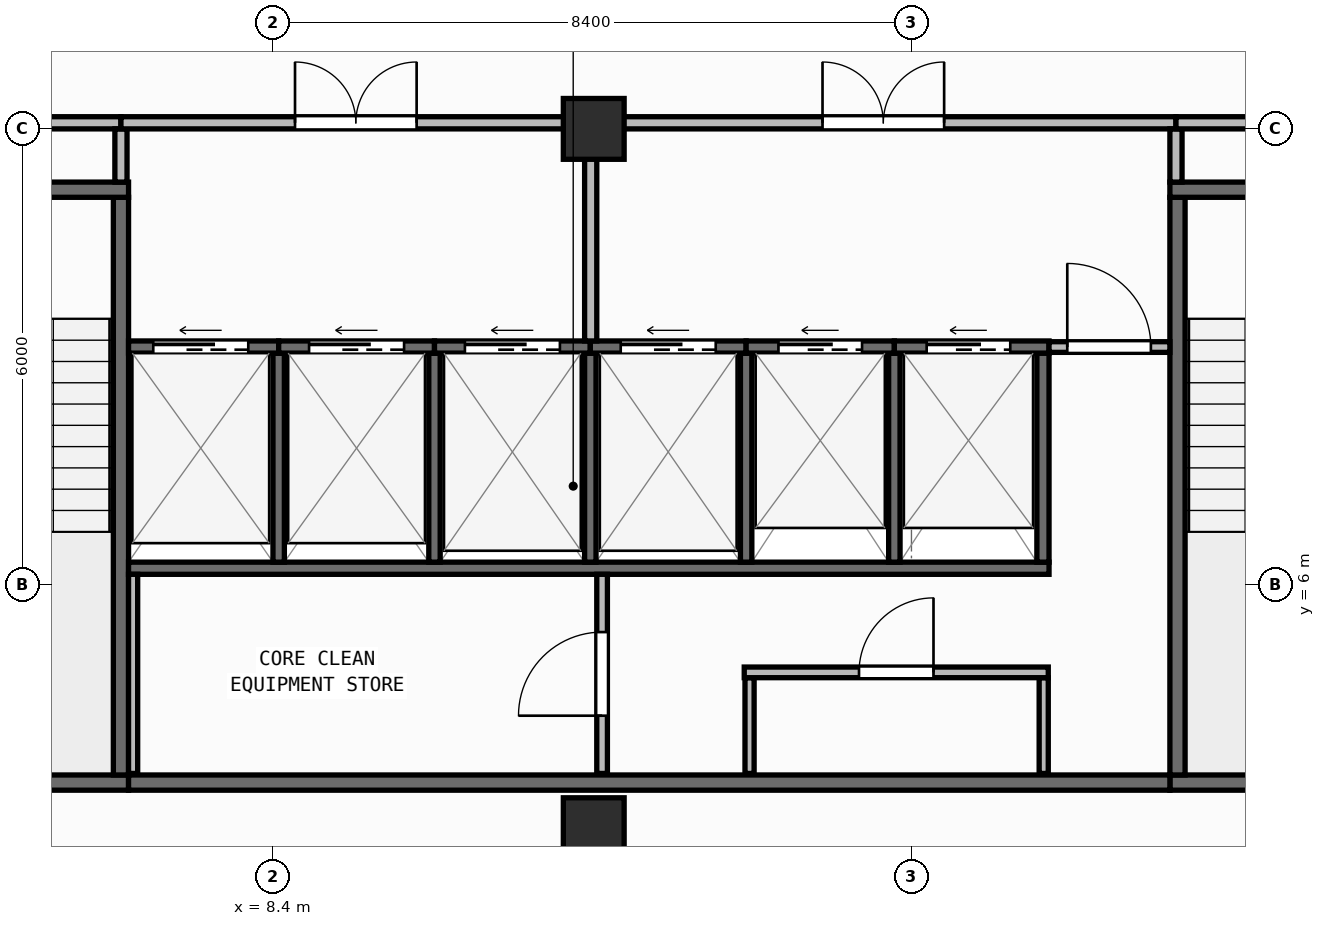
"""IFC4 building model, lengths in metres.
Left out: names, types, materials, properties, quantities, classifications, styles, units other than length and angle.
Written with IfcOpenShell. Run it as: python <this file> out.ifc"""

import sys

from ifc_helpers import new_model, si_unit, direction, frame, frame_2d, origin, origin_2d, place, context, subcontext, project, spatial, rectangle, extrude, element, fill, save


model = new_model("IFC4")
c1 = context("Model", 3, precision=1e-05, world=origin(), true_north=direction((0.0, 1.0)))
c2 = subcontext(c1, "Body", "Model", "MODEL_VIEW")
j1 = project(units=[si_unit("LENGTHUNIT", "METRE"), si_unit("PLANEANGLEUNIT", "RADIAN")], contexts=[c1])
p1 = place(None, origin())
s1 = spatial("IfcSite", under=j1, at=p1, CompositionType="ELEMENT")
p2 = place(p1, origin())
s2 = spatial("IfcBuilding", under=s1, at=p2, CompositionType="ELEMENT")
p3 = place(p2, frame((0.0, 0.0, 264.45)))
s3 = spatial("IfcBuildingStorey", under=s2, at=p3, CompositionType="ELEMENT", Elevation=264.45)
for number, where, z_axis, x_axis in (
    (1, (12.62, 2.8, 0.0), (0.0, 0.0, 1.0), (1.0, 0.0, 0.0)),
    (2, (12.62, 12.0, 0.0), (0.0, 0.0, 1.0), (1.0, 0.0, 0.0)),
):
    element("IfcColumn", number, at=place(p3, frame(where, z_axis=z_axis, x_axis=x_axis)), inside=s3, PredefinedType="COLUMN", context=c2, shape_type="SweptSolid", body=[
        extrude(rectangle(XDim=0.8, YDim=0.8, at=origin_2d()), origin(), (0.0, 0.0, 1.0), 3.95),
    ])
p4 = place(p3, frame((2.56, 0.173, 0.0), z_axis=(0.0, 0.0, 1.0), x_axis=(0.996798206282, 0.079958338856, 0.0)))
e3 = element("IfcWall", 3, at=p4, inside=s3, PredefinedType="STANDARD", context=c2, shape_type="SweptSolid", body=[
    extrude(rectangle(XDim=37.199, YDim=0.26, at=frame_2d((18.6, 0.0))), origin(), (0.0, 0.0, 1.0), 3.71),
])
p5 = place(p4, frame((17.4, 0.0, 0.9)))
e4 = element("IfcOpeningElement", 4, at=p5, cuts=e3, PredefinedType="OPENING", context=c2, shape_type="SweptSolid", body=[
    extrude(rectangle(XDim=2.4, YDim=1.65, at=frame_2d((1.2, 0.825))), frame((0.0, 0.14, 0.0), z_axis=(0.0, -1.0, 0.0), x_axis=(1.0, 0.0, 0.0)), (0.0, 0.0, 1.0), 0.28),
])
p6 = place(p3, frame((2.8, 3.4, 0.0), z_axis=(0.0, 0.0, 1.0), x_axis=(1.0, 0.0, 0.0)))
e5 = element("IfcWall", 5, at=p6, inside=s3, PredefinedType="SHEAR", context=c2, shape_type="SweptSolid", body=[
    extrude(rectangle(XDim=3.7, YDim=0.2, at=frame_2d((1.85, 0.0))), origin(), (0.0, 0.0, 1.0), 3.71),
])
p7 = place(p3, frame((6.4, 3.5, 0.0), z_axis=(0.0, 0.0, 1.0), x_axis=(0.0, 1.0, 0.0)))
e6 = element("IfcWall", 6, at=p7, inside=s3, PredefinedType="SHEAR", context=c2, shape_type="SweptSolid", body=[
    extrude(rectangle(XDim=7.6, YDim=0.2, at=frame_2d((3.8, 0.0))), origin(), (0.0, 0.0, 1.0), 3.71),
])
p8 = place(p3, frame((2.8, 11.2, 0.0), z_axis=(0.0, 0.0, 1.0), x_axis=(1.0, 0.0, 0.0)))
e7 = element("IfcWall", 7, at=p8, inside=s3, PredefinedType="SHEAR", context=c2, shape_type="SweptSolid", body=[
    extrude(rectangle(XDim=3.7, YDim=0.2, at=frame_2d((1.85, 0.0))), origin(), (0.0, 0.0, 1.0), 3.71),
])
p9 = place(p8, frame((1.2, 0.0, 0.0)))
e8 = element("IfcOpeningElement", 8, at=p9, cuts=e7, PredefinedType="OPENING", context=c2, shape_type="SweptSolid", body=[
    extrude(rectangle(XDim=1.3, YDim=2.15, at=frame_2d((0.65, 1.075))), frame((0.0, 0.11, 0.0), z_axis=(0.0, -1.0, 0.0), x_axis=(1.0, 0.0, 0.0)), (0.0, 0.0, 1.0), 0.22),
])
p10 = place(p3, frame((20.2, 3.4, 0.0), z_axis=(0.0, 0.0, 1.0), x_axis=(1.0, 0.0, 0.0)))
e9 = element("IfcWall", 9, at=p10, inside=s3, PredefinedType="SHEAR", context=c2, shape_type="SweptSolid", body=[
    extrude(rectangle(XDim=3.7, YDim=0.2, at=frame_2d((1.85, 0.0))), origin(), (0.0, 0.0, 1.0), 3.71),
])
p11 = place(p3, frame((20.3, 3.5, 0.0), z_axis=(0.0, 0.0, 1.0), x_axis=(0.0, 1.0, 0.0)))
e10 = element("IfcWall", 10, at=p11, inside=s3, PredefinedType="SHEAR", context=c2, shape_type="SweptSolid", body=[
    extrude(rectangle(XDim=7.6, YDim=0.2, at=frame_2d((3.8, 0.0))), origin(), (0.0, 0.0, 1.0), 3.71),
])
p12 = place(p3, frame((20.2, 11.2, 0.0), z_axis=(0.0, 0.0, 1.0), x_axis=(1.0, 0.0, 0.0)))
e11 = element("IfcWall", 11, at=p12, inside=s3, PredefinedType="SHEAR", context=c2, shape_type="SweptSolid", body=[
    extrude(rectangle(XDim=3.7, YDim=0.2, at=frame_2d((1.85, 0.0))), origin(), (0.0, 0.0, 1.0), 3.71),
])
p13 = place(p12, frame((1.2, 0.0, 0.0)))
e12 = element("IfcOpeningElement", 12, at=p13, cuts=e11, PredefinedType="OPENING", context=c2, shape_type="SweptSolid", body=[
    extrude(rectangle(XDim=1.3, YDim=2.15, at=frame_2d((0.65, 1.075))), frame((0.0, 0.11, 0.0), z_axis=(0.0, -1.0, 0.0), x_axis=(1.0, 0.0, 0.0)), (0.0, 0.0, 1.0), 0.22),
])
p14 = place(p3, frame((6.5, 3.4, 0.0), z_axis=(0.0, 0.0, 1.0), x_axis=(1.0, 0.0, 0.0)))
e13 = element("IfcWall", 13, at=p14, inside=s3, PredefinedType="SHEAR", context=c2, shape_type="SweptSolid", body=[
    extrude(rectangle(XDim=13.7, YDim=0.2, at=frame_2d((6.85, 0.0))), origin(), (0.0, 0.0, 1.0), 3.71),
])
p15 = place(p3, frame((6.5, 6.22, 0.0), z_axis=(0.0, 0.0, 1.0), x_axis=(1.0, 0.0, 0.0)))
e14 = element("IfcWall", 14, at=p15, inside=s3, PredefinedType="SHEAR", context=c2, shape_type="SweptSolid", body=[
    extrude(rectangle(XDim=12.11, YDim=0.16, at=frame_2d((6.055, 0.0))), origin(), (0.0, 0.0, 1.0), 3.71),
])
p16 = place(p3, frame((18.53, 6.3, 0.0), z_axis=(0.0, 0.0, 1.0), x_axis=(0.0, 1.0, 0.0)))
e15 = element("IfcWall", 15, at=p16, inside=s3, PredefinedType="SHEAR", context=c2, shape_type="SweptSolid", body=[
    extrude(rectangle(XDim=2.75, YDim=0.16, at=frame_2d((1.375, 0.0))), origin(), (0.0, 0.0, 1.0), 3.71),
])
for number, where, z_axis, x_axis in (
    (16, (8.475, 6.3, 0.0), (0.0, 0.0, 1.0), (0.0, 1.0, 0.0)),
    (17, (10.525, 6.3, 0.0), (0.0, 0.0, 1.0), (0.0, 1.0, 0.0)),
    (18, (12.575, 6.3, 0.0), (0.0, 0.0, 1.0), (0.0, 1.0, 0.0)),
    (19, (14.625, 6.3, 0.0), (0.0, 0.0, 1.0), (0.0, 1.0, 0.0)),
    (20, (16.575, 6.3, 0.0), (0.0, 0.0, 1.0), (0.0, 1.0, 0.0)),
):
    element("IfcWall", number, at=place(p3, frame(where, z_axis=z_axis, x_axis=x_axis)), inside=s3, PredefinedType="SHEAR", context=c2, shape_type="SweptSolid", body=[
        extrude(rectangle(XDim=2.75, YDim=0.15, at=frame_2d((1.375, 0.0))), origin(), (0.0, 0.0, 1.0), 3.71),
    ])
p17 = place(p3, frame((6.5, 9.13, 0.0), z_axis=(0.0, 0.0, 1.0), x_axis=(1.0, 0.0, 0.0)))
e21 = element("IfcWall", 21, at=p17, inside=s3, PredefinedType="SHEAR", context=c2, shape_type="SweptSolid", body=[
    extrude(rectangle(XDim=1.975, YDim=0.16, at=frame_2d((0.988, 0.0))), origin(), (0.0, 0.0, 1.0), 3.71),
])
p18 = place(p17, frame((0.325, 0.0, 0.0)))
e22 = element("IfcOpeningElement", 22, at=p18, cuts=e21, PredefinedType="OPENING", context=c2, shape_type="SweptSolid", body=[
    extrude(rectangle(XDim=1.25, YDim=2.15, at=frame_2d((0.625, 1.075))), frame((0.0, 0.09, 0.0), z_axis=(0.0, -1.0, 0.0), x_axis=(1.0, 0.0, 0.0)), (0.0, 0.0, 1.0), 0.18),
])
p19 = place(p3, frame((8.475, 9.13, 0.0), z_axis=(0.0, 0.0, 1.0), x_axis=(1.0, 0.0, 0.0)))
e23 = element("IfcWall", 23, at=p19, inside=s3, PredefinedType="SHEAR", context=c2, shape_type="SweptSolid", body=[
    extrude(rectangle(XDim=2.05, YDim=0.16, at=frame_2d((1.025, 0.0))), origin(), (0.0, 0.0, 1.0), 3.71),
])
p20 = place(p19, frame((0.4, 0.0, 0.0)))
e24 = element("IfcOpeningElement", 24, at=p20, cuts=e23, PredefinedType="OPENING", context=c2, shape_type="SweptSolid", body=[
    extrude(rectangle(XDim=1.25, YDim=2.15, at=frame_2d((0.625, 1.075))), frame((0.0, 0.09, 0.0), z_axis=(0.0, -1.0, 0.0), x_axis=(1.0, 0.0, 0.0)), (0.0, 0.0, 1.0), 0.18),
])
p21 = place(p3, frame((10.525, 9.13, 0.0), z_axis=(0.0, 0.0, 1.0), x_axis=(1.0, 0.0, 0.0)))
e25 = element("IfcWall", 25, at=p21, inside=s3, PredefinedType="SHEAR", context=c2, shape_type="SweptSolid", body=[
    extrude(rectangle(XDim=2.05, YDim=0.16, at=frame_2d((1.025, 0.0))), origin(), (0.0, 0.0, 1.0), 3.71),
])
p22 = place(p21, frame((0.4, 0.0, 0.0)))
e26 = element("IfcOpeningElement", 26, at=p22, cuts=e25, PredefinedType="OPENING", context=c2, shape_type="SweptSolid", body=[
    extrude(rectangle(XDim=1.25, YDim=2.15, at=frame_2d((0.625, 1.075))), frame((0.0, 0.09, 0.0), z_axis=(0.0, -1.0, 0.0), x_axis=(1.0, 0.0, 0.0)), (0.0, 0.0, 1.0), 0.18),
])
p23 = place(p3, frame((12.575, 9.13, 0.0), z_axis=(0.0, 0.0, 1.0), x_axis=(1.0, 0.0, 0.0)))
e27 = element("IfcWall", 27, at=p23, inside=s3, PredefinedType="SHEAR", context=c2, shape_type="SweptSolid", body=[
    extrude(rectangle(XDim=2.05, YDim=0.16, at=frame_2d((1.025, 0.0))), origin(), (0.0, 0.0, 1.0), 3.71),
])
p24 = place(p23, frame((0.4, 0.0, 0.0)))
e28 = element("IfcOpeningElement", 28, at=p24, cuts=e27, PredefinedType="OPENING", context=c2, shape_type="SweptSolid", body=[
    extrude(rectangle(XDim=1.25, YDim=2.15, at=frame_2d((0.625, 1.075))), frame((0.0, 0.09, 0.0), z_axis=(0.0, -1.0, 0.0), x_axis=(1.0, 0.0, 0.0)), (0.0, 0.0, 1.0), 0.18),
])
p25 = place(p3, frame((14.625, 9.13, 0.0), z_axis=(0.0, 0.0, 1.0), x_axis=(1.0, 0.0, 0.0)))
e29 = element("IfcWall", 29, at=p25, inside=s3, PredefinedType="SHEAR", context=c2, shape_type="SweptSolid", body=[
    extrude(rectangle(XDim=1.95, YDim=0.16, at=frame_2d((0.975, 0.0))), origin(), (0.0, 0.0, 1.0), 3.71),
])
p26 = place(p25, frame((0.425, 0.0, 0.0)))
e30 = element("IfcOpeningElement", 30, at=p26, cuts=e29, PredefinedType="OPENING", context=c2, shape_type="SweptSolid", body=[
    extrude(rectangle(XDim=1.1, YDim=2.15, at=frame_2d((0.55, 1.075))), frame((0.0, 0.09, 0.0), z_axis=(0.0, -1.0, 0.0), x_axis=(1.0, 0.0, 0.0)), (0.0, 0.0, 1.0), 0.18),
])
p27 = place(p3, frame((16.575, 9.13, 0.0), z_axis=(0.0, 0.0, 1.0), x_axis=(1.0, 0.0, 0.0)))
e31 = element("IfcWall", 31, at=p27, inside=s3, PredefinedType="SHEAR", context=c2, shape_type="SweptSolid", body=[
    extrude(rectangle(XDim=2.035, YDim=0.16, at=frame_2d((1.018, 0.0))), origin(), (0.0, 0.0, 1.0), 3.71),
])
p28 = place(p27, frame((0.425, 0.0, 0.0)))
e32 = element("IfcOpeningElement", 32, at=p28, cuts=e31, PredefinedType="OPENING", context=c2, shape_type="SweptSolid", body=[
    extrude(rectangle(XDim=1.1, YDim=2.15, at=frame_2d((0.55, 1.075))), frame((0.0, 0.09, 0.0), z_axis=(0.0, -1.0, 0.0), x_axis=(1.0, 0.0, 0.0)), (0.0, 0.0, 1.0), 0.18),
])
p29 = place(p3, frame((6.56, 3.52, 0.0), z_axis=(0.0, 0.0, 1.0), x_axis=(0.0, 1.0, 0.0)))
e33 = element("IfcWall", 33, at=p29, inside=s3, PredefinedType="PARTITIONING", context=c2, shape_type="SweptSolid", body=[
    extrude(rectangle(XDim=2.62, YDim=0.12, at=frame_2d((1.31, 0.0))), origin(), (0.0, 0.0, 1.0), 3.71),
])
p30 = place(p3, frame((12.73, 3.52, 0.0), z_axis=(0.0, 0.0, 1.0), x_axis=(0.0, 1.0, 0.0)))
e34 = element("IfcWall", 34, at=p30, inside=s3, PredefinedType="PARTITIONING", context=c2, shape_type="SweptSolid", body=[
    extrude(rectangle(XDim=2.62, YDim=0.14, at=frame_2d((1.31, 0.0))), origin(), (0.0, 0.0, 1.0), 3.71),
])
p31 = place(p30, frame((0.76, 0.0, 0.0)))
e35 = element("IfcOpeningElement", 35, at=p31, cuts=e34, PredefinedType="OPENING", context=c2, shape_type="SweptSolid", body=[
    extrude(rectangle(XDim=1.1, YDim=2.1, at=frame_2d((0.55, 1.05))), frame((0.0, 0.08, 0.0), z_axis=(0.0, -1.0, 0.0), x_axis=(1.0, 0.0, 0.0)), (0.0, 0.0, 1.0), 0.16),
])
for number, where, z_axis, x_axis in (
    (36, (14.67, 3.52, 0.0), (0.0, 0.0, 1.0), (0.0, 1.0, 0.0)),
    (37, (18.54, 3.52, 0.0), (0.0, 0.0, 1.0), (0.0, 1.0, 0.0)),
):
    element("IfcWall", number, at=place(p3, frame(where, z_axis=z_axis, x_axis=x_axis)), inside=s3, PredefinedType="PARTITIONING", context=c2, shape_type="SweptSolid", body=[
        extrude(rectangle(XDim=1.26, YDim=0.12, at=frame_2d((0.63, 0.0))), origin(), (0.0, 0.0, 1.0), 3.71),
    ])
p32 = place(p3, frame((14.6, 4.85, 0.0), z_axis=(0.0, 0.0, 1.0), x_axis=(1.0, 0.0, 0.0)))
e38 = element("IfcWall", 38, at=p32, inside=s3, PredefinedType="PARTITIONING", context=c2, shape_type="SweptSolid", body=[
    extrude(rectangle(XDim=4.0, YDim=0.14, at=frame_2d((2.0, 0.0))), origin(), (0.0, 0.0, 1.0), 3.71),
])
p33 = place(p32, frame((1.51, 0.0, 0.0)))
e39 = element("IfcOpeningElement", 39, at=p33, cuts=e38, PredefinedType="OPENING", context=c2, shape_type="SweptSolid", body=[
    extrude(rectangle(XDim=0.98, YDim=2.1, at=frame_2d((0.49, 1.05))), frame((0.0, 0.08, 0.0), z_axis=(0.0, -1.0, 0.0), x_axis=(1.0, 0.0, 0.0)), (0.0, 0.0, 1.0), 0.16),
])
p34 = place(p3, frame((18.61, 9.13, 0.0), z_axis=(0.0, 0.0, 1.0), x_axis=(1.0, 0.0, 0.0)))
e40 = element("IfcWall", 40, at=p34, inside=s3, PredefinedType="PARTITIONING", context=c2, shape_type="SweptSolid", body=[
    extrude(rectangle(XDim=1.59, YDim=0.14, at=frame_2d((0.795, 0.0))), origin(), (0.0, 0.0, 1.0), 3.71),
])
p35 = place(p34, frame((0.24, 0.0, 0.0)))
e41 = element("IfcOpeningElement", 41, at=p35, cuts=e40, PredefinedType="OPENING", context=c2, shape_type="SweptSolid", body=[
    extrude(rectangle(XDim=1.1, YDim=2.1, at=frame_2d((0.55, 1.05))), frame((0.0, 0.08, 0.0), z_axis=(0.0, -1.0, 0.0), x_axis=(1.0, 0.0, 0.0)), (0.0, 0.0, 1.0), 0.16),
])
p36 = place(p3, frame((2.8, 12.08, 0.0), z_axis=(0.0, 0.0, 1.0), x_axis=(1.0, 0.0, 0.0)))
e42 = element("IfcWall", 42, at=p36, inside=s3, PredefinedType="PARTITIONING", context=c2, shape_type="SweptSolid", body=[
    extrude(rectangle(XDim=3.6, YDim=0.16, at=frame_2d((1.8, 0.0))), origin(), (0.0, 0.0, 1.0), 3.157),
])
p37 = place(p36, frame((1.0, 0.0, 0.0)))
e43 = element("IfcOpeningElement", 43, at=p37, cuts=e42, PredefinedType="OPENING", context=c2, shape_type="SweptSolid", body=[
    extrude(rectangle(XDim=1.6, YDim=2.05, at=frame_2d((0.8, 1.025))), frame((0.0, 0.09, 0.0), z_axis=(0.0, -1.0, 0.0), x_axis=(1.0, 0.0, 0.0)), (0.0, 0.0, 1.0), 0.18),
])
p38 = place(p3, frame((6.4, 11.3, 0.0), z_axis=(0.0, 0.0, 1.0), x_axis=(0.0, 1.0, 0.0)))
e44 = element("IfcWall", 44, at=p38, inside=s3, PredefinedType="PARTITIONING", context=c2, shape_type="SweptSolid", body=[
    extrude(rectangle(XDim=0.7, YDim=0.16, at=frame_2d((0.35, 0.0))), origin(), (0.0, 0.0, 1.0), 3.71),
])
p39 = place(p3, frame((6.4, 12.08, 0.0), z_axis=(0.0, 0.0, 1.0), x_axis=(1.0, 0.0, 0.0)))
e45 = element("IfcWall", 45, at=p39, inside=s3, PredefinedType="PARTITIONING", context=c2, shape_type="SweptSolid", body=[
    extrude(rectangle(XDim=6.18, YDim=0.16, at=frame_2d((3.09, 0.0))), origin(), (0.0, 0.0, 1.0), 3.157),
])
p40 = place(p39, frame((2.29, 0.0, 0.0)))
e46 = element("IfcOpeningElement", 46, at=p40, cuts=e45, PredefinedType="OPENING", context=c2, shape_type="SweptSolid", body=[
    extrude(rectangle(XDim=1.6, YDim=2.05, at=frame_2d((0.8, 1.025))), frame((0.0, 0.09, 0.0), z_axis=(0.0, -1.0, 0.0), x_axis=(1.0, 0.0, 0.0)), (0.0, 0.0, 1.0), 0.18),
])
p41 = place(p3, frame((12.58, 9.21, 0.0), z_axis=(0.0, 0.0, 1.0), x_axis=(0.0, 1.0, 0.0)))
e47 = element("IfcWall", 47, at=p41, inside=s3, PredefinedType="PARTITIONING", context=c2, shape_type="SweptSolid", body=[
    extrude(rectangle(XDim=2.79, YDim=0.16, at=frame_2d((1.395, 0.0))), origin(), (0.0, 0.0, 1.0), 3.71),
])
p42 = place(p3, frame((12.58, 12.08, 0.0), z_axis=(0.0, 0.0, 1.0), x_axis=(1.0, 0.0, 0.0)))
e48 = element("IfcWall", 48, at=p42, inside=s3, PredefinedType="PARTITIONING", context=c2, shape_type="SweptSolid", body=[
    extrude(rectangle(XDim=7.7, YDim=0.16, at=frame_2d((3.85, 0.0))), origin(), (0.0, 0.0, 1.0), 3.157),
])
p43 = place(p42, frame((3.05, 0.0, 0.0)))
e49 = element("IfcOpeningElement", 49, at=p43, cuts=e48, PredefinedType="OPENING", context=c2, shape_type="SweptSolid", body=[
    extrude(rectangle(XDim=1.6, YDim=2.05, at=frame_2d((0.8, 1.025))), frame((0.0, 0.09, 0.0), z_axis=(0.0, -1.0, 0.0), x_axis=(1.0, 0.0, 0.0)), (0.0, 0.0, 1.0), 0.18),
])
p44 = place(p3, frame((20.28, 11.3, 0.0), z_axis=(0.0, 0.0, 1.0), x_axis=(0.0, 1.0, 0.0)))
e50 = element("IfcWall", 50, at=p44, inside=s3, PredefinedType="PARTITIONING", context=c2, shape_type="SweptSolid", body=[
    extrude(rectangle(XDim=0.7, YDim=0.16, at=frame_2d((0.35, 0.0))), origin(), (0.0, 0.0, 1.0), 3.71),
])
p45 = place(p3, frame((20.28, 12.08, 0.0), z_axis=(0.0, 0.0, 1.0), x_axis=(1.0, 0.0, 0.0)))
e51 = element("IfcWall", 51, at=p45, inside=s3, PredefinedType="PARTITIONING", context=c2, shape_type="SweptSolid", body=[
    extrude(rectangle(XDim=3.62, YDim=0.16, at=frame_2d((1.81, 0.0))), origin(), (0.0, 0.0, 1.0), 3.157),
])
p46 = place(p45, frame((1.01, 0.0, 0.0)))
e52 = element("IfcOpeningElement", 52, at=p46, cuts=e51, PredefinedType="OPENING", context=c2, shape_type="SweptSolid", body=[
    extrude(rectangle(XDim=1.6, YDim=2.05, at=frame_2d((0.8, 1.025))), frame((0.0, 0.09, 0.0), z_axis=(0.0, -1.0, 0.0), x_axis=(1.0, 0.0, 0.0)), (0.0, 0.0, 1.0), 0.18),
])
p47 = place(p18, origin())
e53 = element("IfcDoor", 53, at=p47, inside=s3, OperationType="SLIDING_TO_LEFT", PredefinedType="DOOR", context=c2, shape_type="SweptSolid", body=[
    extrude(rectangle(XDim=1.25, YDim=2.15, at=frame_2d((0.625, 1.075))), frame((0.0, 0.025, 0.0), z_axis=(0.0, -1.0, 0.0), x_axis=(1.0, 0.0, 0.0)), (0.0, 0.0, 1.0), 0.05),
])
fill(e22, e53)
p48 = place(p20, origin())
e54 = element("IfcDoor", 54, at=p48, inside=s3, OperationType="SLIDING_TO_LEFT", PredefinedType="DOOR", context=c2, shape_type="SweptSolid", body=[
    extrude(rectangle(XDim=1.25, YDim=2.15, at=frame_2d((0.625, 1.075))), frame((0.0, 0.025, 0.0), z_axis=(0.0, -1.0, 0.0), x_axis=(1.0, 0.0, 0.0)), (0.0, 0.0, 1.0), 0.05),
])
fill(e24, e54)
p49 = place(p22, origin())
e55 = element("IfcDoor", 55, at=p49, inside=s3, OperationType="SLIDING_TO_LEFT", PredefinedType="DOOR", context=c2, shape_type="SweptSolid", body=[
    extrude(rectangle(XDim=1.25, YDim=2.15, at=frame_2d((0.625, 1.075))), frame((0.0, 0.025, 0.0), z_axis=(0.0, -1.0, 0.0), x_axis=(1.0, 0.0, 0.0)), (0.0, 0.0, 1.0), 0.05),
])
fill(e26, e55)
p50 = place(p24, origin())
e56 = element("IfcDoor", 56, at=p50, inside=s3, OperationType="SLIDING_TO_LEFT", PredefinedType="DOOR", context=c2, shape_type="SweptSolid", body=[
    extrude(rectangle(XDim=1.25, YDim=2.15, at=frame_2d((0.625, 1.075))), frame((0.0, 0.025, 0.0), z_axis=(0.0, -1.0, 0.0), x_axis=(1.0, 0.0, 0.0)), (0.0, 0.0, 1.0), 0.05),
])
fill(e28, e56)
p51 = place(p26, origin())
e57 = element("IfcDoor", 57, at=p51, inside=s3, OperationType="SLIDING_TO_LEFT", PredefinedType="DOOR", context=c2, shape_type="SweptSolid", body=[
    extrude(rectangle(XDim=1.1, YDim=2.15, at=frame_2d((0.55, 1.075))), frame((0.0, 0.025, 0.0), z_axis=(0.0, -1.0, 0.0), x_axis=(1.0, 0.0, 0.0)), (0.0, 0.0, 1.0), 0.05),
])
fill(e30, e57)
p52 = place(p28, origin())
e58 = element("IfcDoor", 58, at=p52, inside=s3, OperationType="SLIDING_TO_LEFT", PredefinedType="DOOR", context=c2, shape_type="SweptSolid", body=[
    extrude(rectangle(XDim=1.1, YDim=2.15, at=frame_2d((0.55, 1.075))), frame((0.0, 0.025, 0.0), z_axis=(0.0, -1.0, 0.0), x_axis=(1.0, 0.0, 0.0)), (0.0, 0.0, 1.0), 0.05),
])
fill(e32, e58)
p53 = place(p31, origin())
e59 = element("IfcDoor", 59, at=p53, inside=s3, OperationType="SINGLE_SWING_LEFT", PredefinedType="DOOR", context=c2, shape_type="SweptSolid", body=[
    extrude(rectangle(XDim=1.1, YDim=2.1, at=frame_2d((0.55, 1.05))), frame((0.0, 0.025, 0.0), z_axis=(0.0, -1.0, 0.0), x_axis=(1.0, 0.0, 0.0)), (0.0, 0.0, 1.0), 0.05),
])
fill(e35, e59)
p54 = place(p33, origin())
e60 = element("IfcDoor", 60, at=p54, inside=s3, OperationType="SINGLE_SWING_RIGHT", PredefinedType="DOOR", context=c2, shape_type="SweptSolid", body=[
    extrude(rectangle(XDim=0.98, YDim=2.1, at=frame_2d((0.49, 1.05))), frame((0.0, 0.025, 0.0), z_axis=(0.0, -1.0, 0.0), x_axis=(1.0, 0.0, 0.0)), (0.0, 0.0, 1.0), 0.05),
])
fill(e39, e60)
p55 = place(p35, origin())
e61 = element("IfcDoor", 61, at=p55, inside=s3, OperationType="SINGLE_SWING_LEFT", PredefinedType="DOOR", context=c2, shape_type="SweptSolid", body=[
    extrude(rectangle(XDim=1.1, YDim=2.1, at=frame_2d((0.55, 1.05))), frame((0.0, 0.025, 0.0), z_axis=(0.0, -1.0, 0.0), x_axis=(1.0, 0.0, 0.0)), (0.0, 0.0, 1.0), 0.05),
])
fill(e41, e61)
p56 = place(p40, origin())
e62 = element("IfcDoor", 62, at=p56, inside=s3, OperationType="DOUBLE_DOOR_SINGLE_SWING", PredefinedType="DOOR", context=c2, shape_type="SweptSolid", body=[
    extrude(rectangle(XDim=1.6, YDim=2.05, at=frame_2d((0.8, 1.025))), frame((0.0, 0.025, 0.0), z_axis=(0.0, -1.0, 0.0), x_axis=(1.0, 0.0, 0.0)), (0.0, 0.0, 1.0), 0.05),
])
fill(e46, e62)
p57 = place(p43, origin())
e63 = element("IfcDoor", 63, at=p57, inside=s3, OperationType="DOUBLE_DOOR_SINGLE_SWING", PredefinedType="DOOR", context=c2, shape_type="SweptSolid", body=[
    extrude(rectangle(XDim=1.6, YDim=2.05, at=frame_2d((0.8, 1.025))), frame((0.0, 0.025, 0.0), z_axis=(0.0, -1.0, 0.0), x_axis=(1.0, 0.0, 0.0)), (0.0, 0.0, 1.0), 0.05),
])
fill(e49, e63)
save(model, sys.argv[1])
